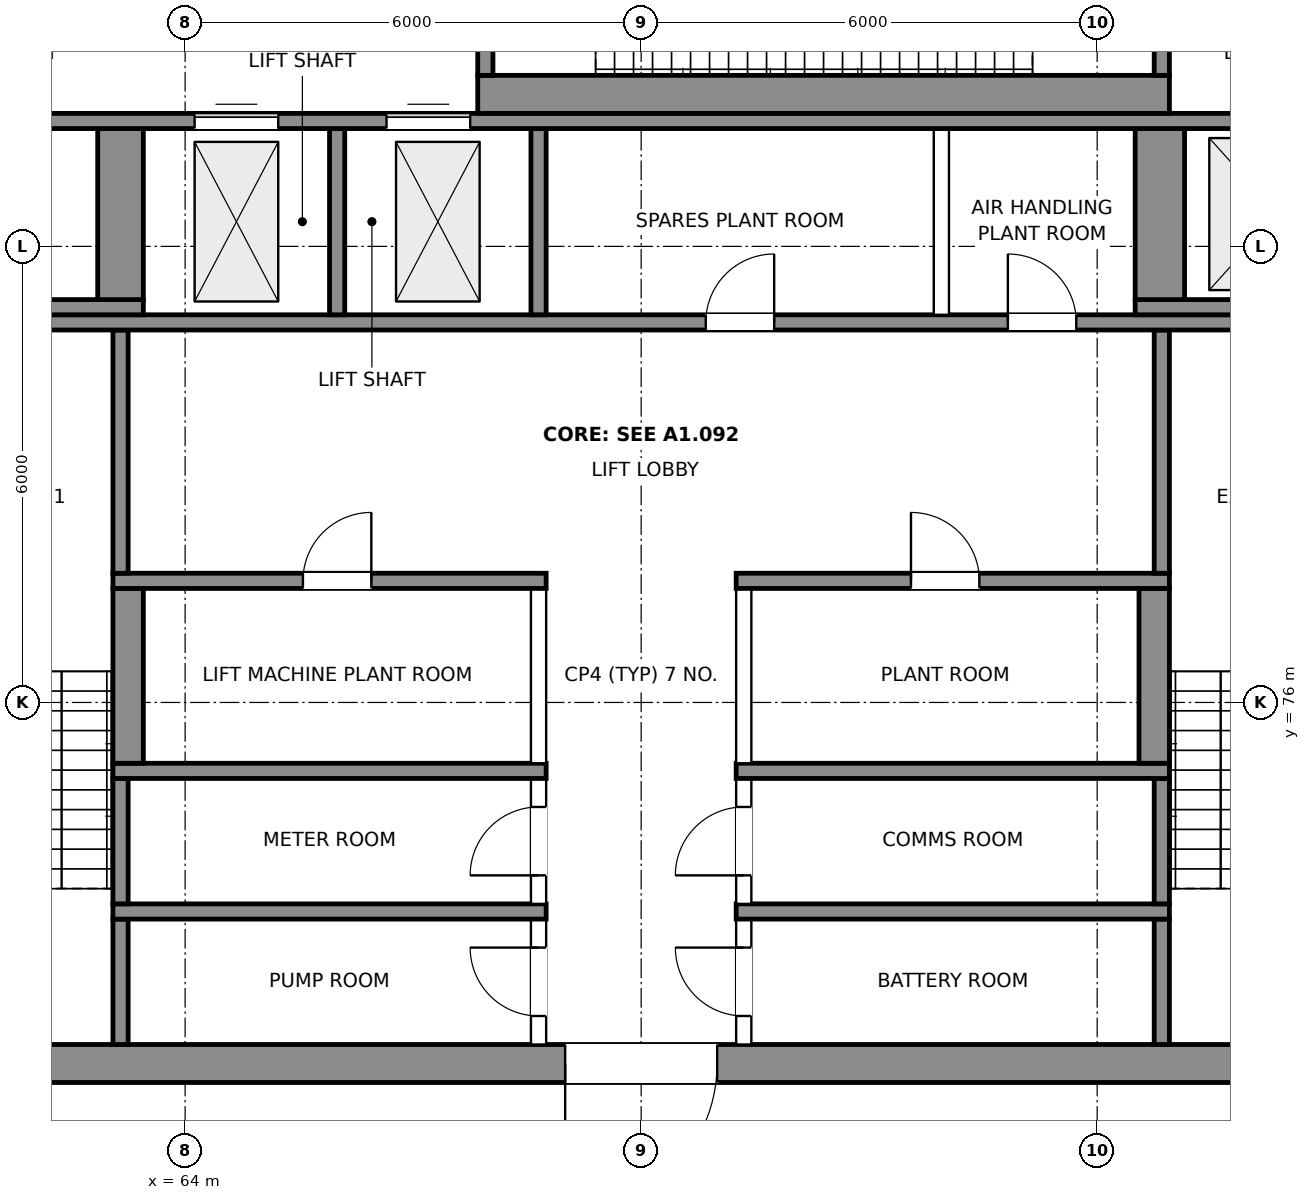
"""IFC4 building model, lengths in metres.
Left out: names, types, materials, properties, quantities, classifications, styles, units other than length and angle.
Written with IfcOpenShell. Run it as: python <this file> out.ifc"""

import sys

from ifc_helpers import new_model, si_unit, direction, frame, frame_2d, origin, place, context, subcontext, project, spatial, rectangle, extrude, element, fill, save


model = new_model("IFC4")
c1 = context("Model", 3, precision=1e-05, world=origin(), true_north=direction((0.0, 1.0)))
c2 = subcontext(c1, "Body", "Model", "MODEL_VIEW")
j1 = project(units=[si_unit("LENGTHUNIT", "METRE"), si_unit("PLANEANGLEUNIT", "RADIAN")], contexts=[c1])
p1 = place(None, origin())
s1 = spatial("IfcSite", under=j1, at=p1, CompositionType="ELEMENT")
p2 = place(p1, origin())
s2 = spatial("IfcBuilding", under=s1, at=p2, CompositionType="ELEMENT")
p3 = place(p2, frame((0.0, 0.0, 333.2)))
s3 = spatial("IfcBuildingStorey", under=s2, at=p3, CompositionType="ELEMENT", Elevation=333.2)
p4 = place(p3, frame((59.0, 71.25, 0.0), z_axis=(0.0, 0.0, 1.0), x_axis=(1.0, 0.0, 0.0)))
e1 = element("IfcWall", 1, at=p4, inside=s3, PredefinedType="SHEAR", context=c2, shape_type="SweptSolid", body=[
    extrude(rectangle(XDim=22.0, YDim=0.5, at=frame_2d((11.0, 0.0))), origin(), (0.0, 0.0, 1.0), 4.5),
])
p5 = place(p4, frame((2.025, 0.0, 0.0)))
e2 = element("IfcOpeningElement", 2, at=p5, cuts=e1, PredefinedType="OPENING", context=c2, shape_type="SweptSolid", body=[
    extrude(rectangle(XDim=1.2, YDim=2.1, at=frame_2d((0.6, 1.05))), frame((0.0, 0.26, 0.0), z_axis=(0.0, -1.0, 0.0), x_axis=(1.0, 0.0, 0.0)), (0.0, 0.0, 1.0), 0.52),
])
p6 = place(p4, frame((18.775, 0.0, 0.0)))
e3 = element("IfcOpeningElement", 3, at=p6, cuts=e1, PredefinedType="OPENING", context=c2, shape_type="SweptSolid", body=[
    extrude(rectangle(XDim=1.2, YDim=2.1, at=frame_2d((0.6, 1.05))), frame((0.0, 0.26, 0.0), z_axis=(0.0, -1.0, 0.0), x_axis=(1.0, 0.0, 0.0)), (0.0, 0.0, 1.0), 0.52),
])
p7 = place(p4, frame((10.0, 0.0, 0.0)))
e4 = element("IfcOpeningElement", 4, at=p7, cuts=e1, PredefinedType="OPENING", context=c2, shape_type="SweptSolid", body=[
    extrude(rectangle(XDim=2.0, YDim=2.1, at=frame_2d((1.0, 1.05))), frame((0.0, 0.26, 0.0), z_axis=(0.0, -1.0, 0.0), x_axis=(1.0, 0.0, 0.0)), (0.0, 0.0, 1.0), 0.52),
])
p8 = place(p3, frame((63.15, 71.5, 0.0), z_axis=(0.0, 0.0, 1.0), x_axis=(0.0, 1.0, 0.0)))
e5 = element("IfcWall", 5, at=p8, inside=s3, PredefinedType="SHEAR", context=c2, shape_type="SweptSolid", body=[
    extrude(rectangle(XDim=1.65, YDim=0.2, at=frame_2d((0.825, 0.0))), origin(), (0.0, 0.0, 1.0), 4.5),
])
p9 = place(p3, frame((68.65, 71.5, 0.0), z_axis=(0.0, 0.0, 1.0), x_axis=(0.0, 1.0, 0.0)))
e6 = element("IfcWall", 6, at=p9, inside=s3, PredefinedType="PARTITIONING", context=c2, shape_type="SweptSolid", body=[
    extrude(rectangle(XDim=1.65, YDim=0.2, at=frame_2d((0.825, 0.0))), origin(), (0.0, 0.0, 1.0), 4.2),
])
p10 = place(p9, frame((0.375, 0.0, 0.0)))
e7 = element("IfcOpeningElement", 7, at=p10, cuts=e6, PredefinedType="OPENING", context=c2, shape_type="SweptSolid", body=[
    extrude(rectangle(XDim=0.9, YDim=2.1, at=frame_2d((0.45, 1.05))), frame((0.0, 0.11, 0.0), z_axis=(0.0, -1.0, 0.0), x_axis=(1.0, 0.0, 0.0)), (0.0, 0.0, 1.0), 0.22),
])
p11 = place(p3, frame((71.35, 71.5, 0.0), z_axis=(0.0, 0.0, 1.0), x_axis=(0.0, 1.0, 0.0)))
e8 = element("IfcWall", 8, at=p11, inside=s3, PredefinedType="PARTITIONING", context=c2, shape_type="SweptSolid", body=[
    extrude(rectangle(XDim=1.65, YDim=0.2, at=frame_2d((0.825, 0.0))), origin(), (0.0, 0.0, 1.0), 4.2),
])
p12 = place(p11, frame((0.375, 0.0, 0.0)))
e9 = element("IfcOpeningElement", 9, at=p12, cuts=e8, PredefinedType="OPENING", context=c2, shape_type="SweptSolid", body=[
    extrude(rectangle(XDim=0.9, YDim=2.1, at=frame_2d((0.45, 1.05))), frame((0.0, 0.11, 0.0), z_axis=(0.0, -1.0, 0.0), x_axis=(1.0, 0.0, 0.0)), (0.0, 0.0, 1.0), 0.22),
])
p13 = place(p3, frame((76.85, 71.5, 0.0), z_axis=(0.0, 0.0, 1.0), x_axis=(0.0, 1.0, 0.0)))
e10 = element("IfcWall", 10, at=p13, inside=s3, PredefinedType="SHEAR", context=c2, shape_type="SweptSolid", body=[
    extrude(rectangle(XDim=1.65, YDim=0.2, at=frame_2d((0.825, 0.0))), origin(), (0.0, 0.0, 1.0), 4.5),
])
for number, where, z_axis, x_axis in (
    (11, (63.05, 73.25, 0.0), (0.0, 0.0, 1.0), (1.0, 0.0, 0.0)),
    (12, (71.25, 73.25, 0.0), (0.0, 0.0, 1.0), (1.0, 0.0, 0.0)),
):
    element("IfcWall", number, at=place(p3, frame(where, z_axis=z_axis, x_axis=x_axis)), inside=s3, PredefinedType="SHEAR", context=c2, shape_type="SweptSolid", body=[
        extrude(rectangle(XDim=5.7, YDim=0.2, at=frame_2d((2.85, 0.0))), origin(), (0.0, 0.0, 1.0), 4.5),
    ])
p14 = place(p3, frame((63.15, 73.35, 0.0), z_axis=(0.0, 0.0, 1.0), x_axis=(0.0, 1.0, 0.0)))
e13 = element("IfcWall", 13, at=p14, inside=s3, PredefinedType="SHEAR", context=c2, shape_type="SweptSolid", body=[
    extrude(rectangle(XDim=1.65, YDim=0.2, at=frame_2d((0.825, 0.0))), origin(), (0.0, 0.0, 1.0), 4.5),
])
p15 = place(p3, frame((68.65, 73.35, 0.0), z_axis=(0.0, 0.0, 1.0), x_axis=(0.0, 1.0, 0.0)))
e14 = element("IfcWall", 14, at=p15, inside=s3, PredefinedType="PARTITIONING", context=c2, shape_type="SweptSolid", body=[
    extrude(rectangle(XDim=1.65, YDim=0.2, at=frame_2d((0.825, 0.0))), origin(), (0.0, 0.0, 1.0), 4.2),
])
p16 = place(p15, frame((0.375, 0.0, 0.0)))
e15 = element("IfcOpeningElement", 15, at=p16, cuts=e14, PredefinedType="OPENING", context=c2, shape_type="SweptSolid", body=[
    extrude(rectangle(XDim=0.9, YDim=2.1, at=frame_2d((0.45, 1.05))), frame((0.0, 0.11, 0.0), z_axis=(0.0, -1.0, 0.0), x_axis=(1.0, 0.0, 0.0)), (0.0, 0.0, 1.0), 0.22),
])
p17 = place(p3, frame((71.35, 73.35, 0.0), z_axis=(0.0, 0.0, 1.0), x_axis=(0.0, 1.0, 0.0)))
e16 = element("IfcWall", 16, at=p17, inside=s3, PredefinedType="PARTITIONING", context=c2, shape_type="SweptSolid", body=[
    extrude(rectangle(XDim=1.65, YDim=0.2, at=frame_2d((0.825, 0.0))), origin(), (0.0, 0.0, 1.0), 4.2),
])
p18 = place(p17, frame((0.375, 0.0, 0.0)))
e17 = element("IfcOpeningElement", 17, at=p18, cuts=e16, PredefinedType="OPENING", context=c2, shape_type="SweptSolid", body=[
    extrude(rectangle(XDim=0.9, YDim=2.1, at=frame_2d((0.45, 1.05))), frame((0.0, 0.11, 0.0), z_axis=(0.0, -1.0, 0.0), x_axis=(1.0, 0.0, 0.0)), (0.0, 0.0, 1.0), 0.22),
])
p19 = place(p3, frame((76.85, 73.35, 0.0), z_axis=(0.0, 0.0, 1.0), x_axis=(0.0, 1.0, 0.0)))
e18 = element("IfcWall", 18, at=p19, inside=s3, PredefinedType="SHEAR", context=c2, shape_type="SweptSolid", body=[
    extrude(rectangle(XDim=1.65, YDim=0.2, at=frame_2d((0.825, 0.0))), origin(), (0.0, 0.0, 1.0), 4.5),
])
for number, where, z_axis, x_axis in (
    (19, (63.05, 75.1, 0.0), (0.0, 0.0, 1.0), (1.0, 0.0, 0.0)),
    (20, (71.25, 75.1, 0.0), (0.0, 0.0, 1.0), (1.0, 0.0, 0.0)),
):
    element("IfcWall", number, at=place(p3, frame(where, z_axis=z_axis, x_axis=x_axis)), inside=s3, PredefinedType="SHEAR", context=c2, shape_type="SweptSolid", body=[
        extrude(rectangle(XDim=5.7, YDim=0.2, at=frame_2d((2.85, 0.0))), origin(), (0.0, 0.0, 1.0), 4.5),
    ])
p20 = place(p3, frame((63.25, 75.2, 0.0), z_axis=(0.0, 0.0, 1.0), x_axis=(0.0, 1.0, 0.0)))
e21 = element("IfcWall", 21, at=p20, inside=s3, PredefinedType="SHEAR", context=c2, shape_type="SweptSolid", body=[
    extrude(rectangle(XDim=2.3, YDim=0.4, at=frame_2d((1.15, 0.0))), origin(), (0.0, 0.0, 1.0), 4.5),
])
for number, where, z_axis, x_axis in (
    (22, (68.65, 75.2, 0.0), (0.0, 0.0, 1.0), (0.0, 1.0, 0.0)),
    (23, (71.35, 75.2, 0.0), (0.0, 0.0, 1.0), (0.0, 1.0, 0.0)),
):
    element("IfcWall", number, at=place(p3, frame(where, z_axis=z_axis, x_axis=x_axis)), inside=s3, PredefinedType="PARTITIONING", context=c2, shape_type="SweptSolid", body=[
        extrude(rectangle(XDim=2.3, YDim=0.2, at=frame_2d((1.15, 0.0))), origin(), (0.0, 0.0, 1.0), 4.2),
    ])
p21 = place(p3, frame((76.75, 75.2, 0.0), z_axis=(0.0, 0.0, 1.0), x_axis=(0.0, 1.0, 0.0)))
e24 = element("IfcWall", 24, at=p21, inside=s3, PredefinedType="SHEAR", context=c2, shape_type="SweptSolid", body=[
    extrude(rectangle(XDim=2.3, YDim=0.4, at=frame_2d((1.15, 0.0))), origin(), (0.0, 0.0, 1.0), 4.5),
])
p22 = place(p3, frame((63.05, 77.6, 0.0), z_axis=(0.0, 0.0, 1.0), x_axis=(1.0, 0.0, 0.0)))
e25 = element("IfcWall", 25, at=p22, inside=s3, PredefinedType="SHEAR", context=c2, shape_type="SweptSolid", body=[
    extrude(rectangle(XDim=5.7, YDim=0.2, at=frame_2d((2.85, 0.0))), origin(), (0.0, 0.0, 1.0), 4.5),
])
p23 = place(p22, frame((2.5, 0.0, 0.0)))
e26 = element("IfcOpeningElement", 26, at=p23, cuts=e25, PredefinedType="OPENING", context=c2, shape_type="SweptSolid", body=[
    extrude(rectangle(XDim=0.9, YDim=2.1, at=frame_2d((0.45, 1.05))), frame((0.0, 0.11, 0.0), z_axis=(0.0, -1.0, 0.0), x_axis=(1.0, 0.0, 0.0)), (0.0, 0.0, 1.0), 0.22),
])
p24 = place(p3, frame((71.25, 77.6, 0.0), z_axis=(0.0, 0.0, 1.0), x_axis=(1.0, 0.0, 0.0)))
e27 = element("IfcWall", 27, at=p24, inside=s3, PredefinedType="SHEAR", context=c2, shape_type="SweptSolid", body=[
    extrude(rectangle(XDim=5.7, YDim=0.2, at=frame_2d((2.85, 0.0))), origin(), (0.0, 0.0, 1.0), 4.5),
])
p25 = place(p24, frame((2.3, 0.0, 0.0)))
e28 = element("IfcOpeningElement", 28, at=p25, cuts=e27, PredefinedType="OPENING", context=c2, shape_type="SweptSolid", body=[
    extrude(rectangle(XDim=0.9, YDim=2.1, at=frame_2d((0.45, 1.05))), frame((0.0, 0.11, 0.0), z_axis=(0.0, -1.0, 0.0), x_axis=(1.0, 0.0, 0.0)), (0.0, 0.0, 1.0), 0.22),
])
for number, where, z_axis, x_axis in (
    (29, (63.15, 77.7, 0.0), (0.0, 0.0, 1.0), (0.0, 1.0, 0.0)),
    (30, (76.85, 77.7, 0.0), (0.0, 0.0, 1.0), (0.0, 1.0, 0.0)),
):
    element("IfcWall", number, at=place(p3, frame(where, z_axis=z_axis, x_axis=x_axis)), inside=s3, PredefinedType="SHEAR", context=c2, shape_type="SweptSolid", body=[
        extrude(rectangle(XDim=3.2, YDim=0.2, at=frame_2d((1.6, 0.0))), origin(), (0.0, 0.0, 1.0), 4.5),
    ])
p26 = place(p3, frame((59.0, 81.0, 0.0), z_axis=(0.0, 0.0, 1.0), x_axis=(1.0, 0.0, 0.0)))
e31 = element("IfcWall", 31, at=p26, inside=s3, PredefinedType="SHEAR", context=c2, shape_type="SweptSolid", body=[
    extrude(rectangle(XDim=22.0, YDim=0.2, at=frame_2d((11.0, 0.0))), origin(), (0.0, 0.0, 1.0), 4.5),
])
p27 = place(p26, frame((11.85, 0.0, 0.0)))
e32 = element("IfcOpeningElement", 32, at=p27, cuts=e31, PredefinedType="OPENING", context=c2, shape_type="SweptSolid", body=[
    extrude(rectangle(XDim=0.9, YDim=2.1, at=frame_2d((0.45, 1.05))), frame((0.0, 0.11, 0.0), z_axis=(0.0, -1.0, 0.0), x_axis=(1.0, 0.0, 0.0)), (0.0, 0.0, 1.0), 0.22),
])
p28 = place(p26, frame((15.825, 0.0, 0.0)))
e33 = element("IfcOpeningElement", 33, at=p28, cuts=e31, PredefinedType="OPENING", context=c2, shape_type="SweptSolid", body=[
    extrude(rectangle(XDim=0.9, YDim=2.1, at=frame_2d((0.45, 1.05))), frame((0.0, 0.11, 0.0), z_axis=(0.0, -1.0, 0.0), x_axis=(1.0, 0.0, 0.0)), (0.0, 0.0, 1.0), 0.22),
])
p29 = place(p3, frame((59.0, 81.2, 0.0), z_axis=(0.0, 0.0, 1.0), x_axis=(1.0, 0.0, 0.0)))
e34 = element("IfcWall", 34, at=p29, inside=s3, PredefinedType="SHEAR", context=c2, shape_type="SweptSolid", body=[
    extrude(rectangle(XDim=4.45, YDim=0.2, at=frame_2d((2.225, 0.0))), origin(), (0.0, 0.0, 1.0), 4.5),
])
for number, where, z_axis, x_axis in (
    (35, (66.0, 81.1, 0.0), (0.0, 0.0, 1.0), (0.0, 1.0, 0.0)),
    (36, (68.65, 81.1, 0.0), (0.0, 0.0, 1.0), (0.0, 1.0, 0.0)),
):
    element("IfcWall", number, at=place(p3, frame(where, z_axis=z_axis, x_axis=x_axis)), inside=s3, PredefinedType="SHEAR", context=c2, shape_type="SweptSolid", body=[
        extrude(rectangle(XDim=2.45, YDim=0.2, at=frame_2d((1.225, 0.0))), origin(), (0.0, 0.0, 1.0), 4.5),
    ])
p30 = place(p3, frame((73.95, 81.1, 0.0), z_axis=(0.0, 0.0, 1.0), x_axis=(0.0, 1.0, 0.0)))
e37 = element("IfcWall", 37, at=p30, inside=s3, PredefinedType="PARTITIONING", context=c2, shape_type="SweptSolid", body=[
    extrude(rectangle(XDim=2.45, YDim=0.2, at=frame_2d((1.225, 0.0))), origin(), (0.0, 0.0, 1.0), 4.2),
])
p31 = place(p3, frame((76.5, 81.2, 0.0), z_axis=(0.0, 0.0, 1.0), x_axis=(1.0, 0.0, 0.0)))
e38 = element("IfcWall", 38, at=p31, inside=s3, PredefinedType="SHEAR", context=c2, shape_type="SweptSolid", body=[
    extrude(rectangle(XDim=4.5, YDim=0.2, at=frame_2d((2.25, 0.0))), origin(), (0.0, 0.0, 1.0), 4.5),
])
p32 = place(p3, frame((63.15, 81.3, 0.0), z_axis=(0.0, 0.0, 1.0), x_axis=(0.0, 1.0, 0.0)))
e39 = element("IfcWall", 39, at=p32, inside=s3, PredefinedType="SHEAR", context=c2, shape_type="SweptSolid", body=[
    extrude(rectangle(XDim=2.25, YDim=0.6, at=frame_2d((1.125, 0.0))), origin(), (0.0, 0.0, 1.0), 4.5),
])
p33 = place(p3, frame((76.825, 81.3, 0.0), z_axis=(0.0, 0.0, 1.0), x_axis=(0.0, 1.0, 0.0)))
e40 = element("IfcWall", 40, at=p33, inside=s3, PredefinedType="SHEAR", context=c2, shape_type="SweptSolid", body=[
    extrude(rectangle(XDim=2.25, YDim=0.65, at=frame_2d((1.125, 0.0))), origin(), (0.0, 0.0, 1.0), 4.5),
])
p34 = place(p3, frame((59.0, 83.65, 0.0), z_axis=(0.0, 0.0, 1.0), x_axis=(1.0, 0.0, 0.0)))
e41 = element("IfcWall", 41, at=p34, inside=s3, PredefinedType="SHEAR", context=c2, shape_type="SweptSolid", body=[
    extrude(rectangle(XDim=22.0, YDim=0.2, at=frame_2d((11.0, 0.0))), origin(), (0.0, 0.0, 1.0), 4.5),
])
p35 = place(p34, frame((5.125, 0.0, 0.0)))
e42 = element("IfcOpeningElement", 42, at=p35, cuts=e41, PredefinedType="OPENING", context=c2, shape_type="SweptSolid", body=[
    extrude(rectangle(XDim=1.1, YDim=2.1, at=frame_2d((0.55, 1.05))), frame((0.0, 0.11, 0.0), z_axis=(0.0, -1.0, 0.0), x_axis=(1.0, 0.0, 0.0)), (0.0, 0.0, 1.0), 0.22),
])
p36 = place(p34, frame((7.65, 0.0, 0.0)))
e43 = element("IfcOpeningElement", 43, at=p36, cuts=e41, PredefinedType="OPENING", context=c2, shape_type="SweptSolid", body=[
    extrude(rectangle(XDim=1.1, YDim=2.1, at=frame_2d((0.55, 1.05))), frame((0.0, 0.11, 0.0), z_axis=(0.0, -1.0, 0.0), x_axis=(1.0, 0.0, 0.0)), (0.0, 0.0, 1.0), 0.22),
])
p37 = place(p34, frame((18.775, 0.0, 0.0)))
e44 = element("IfcOpeningElement", 44, at=p37, cuts=e41, PredefinedType="OPENING", context=c2, shape_type="SweptSolid", body=[
    extrude(rectangle(XDim=1.2, YDim=2.1, at=frame_2d((0.6, 1.05))), frame((0.0, 0.11, 0.0), z_axis=(0.0, -1.0, 0.0), x_axis=(1.0, 0.0, 0.0)), (0.0, 0.0, 1.0), 0.22),
])
p38 = place(p34, frame((2.075, 0.0, 0.0)))
e45 = element("IfcOpeningElement", 45, at=p38, cuts=e41, PredefinedType="OPENING", context=c2, shape_type="SweptSolid", body=[
    extrude(rectangle(XDim=1.1, YDim=2.1, at=frame_2d((0.55, 1.05))), frame((0.0, 0.11, 0.0), z_axis=(0.0, -1.0, 0.0), x_axis=(1.0, 0.0, 0.0)), (0.0, 0.0, 1.0), 0.22),
])
p39 = place(p3, frame((67.85, 84.0, 0.0), z_axis=(0.0, 0.0, 1.0), x_axis=(1.0, 0.0, 0.0)))
e46 = element("IfcWall", 46, at=p39, inside=s3, PredefinedType="SHEAR", context=c2, shape_type="SweptSolid", body=[
    extrude(rectangle(XDim=9.1, YDim=0.5, at=frame_2d((4.55, 0.0))), origin(), (0.0, 0.0, 1.0), 4.5),
])
p40 = place(p3, frame((67.95, 84.25, 0.0), z_axis=(0.0, 0.0, 1.0), x_axis=(0.0, 1.0, 0.0)))
e47 = element("IfcWall", 47, at=p40, inside=s3, PredefinedType="SHEAR", context=c2, shape_type="SweptSolid", body=[
    extrude(rectangle(XDim=2.85, YDim=0.2, at=frame_2d((1.425, 0.0))), origin(), (0.0, 0.0, 1.0), 4.5),
])
p41 = place(p40, frame((0.825, 0.0, 0.0)))
e48 = element("IfcOpeningElement", 48, at=p41, cuts=e47, PredefinedType="OPENING", context=c2, shape_type="SweptSolid", body=[
    extrude(rectangle(XDim=1.2, YDim=2.1, at=frame_2d((0.6, 1.05))), frame((0.0, 0.11, 0.0), z_axis=(0.0, -1.0, 0.0), x_axis=(1.0, 0.0, 0.0)), (0.0, 0.0, 1.0), 0.22),
])
p42 = place(p3, frame((76.85, 84.25, 0.0), z_axis=(0.0, 0.0, 1.0), x_axis=(0.0, 1.0, 0.0)))
e49 = element("IfcWall", 49, at=p42, inside=s3, PredefinedType="SHEAR", context=c2, shape_type="SweptSolid", body=[
    extrude(rectangle(XDim=2.85, YDim=0.2, at=frame_2d((1.425, 0.0))), origin(), (0.0, 0.0, 1.0), 4.5),
])
p43 = place(p42, frame((1.575, 0.0, 0.0)))
e50 = element("IfcOpeningElement", 50, at=p43, cuts=e49, PredefinedType="OPENING", context=c2, shape_type="SweptSolid", body=[
    extrude(rectangle(XDim=1.2, YDim=2.1, at=frame_2d((0.6, 1.05))), frame((0.0, 0.11, 0.0), z_axis=(0.0, -1.0, 0.0), x_axis=(1.0, 0.0, 0.0)), (0.0, 0.0, 1.0), 0.22),
])
p44 = place(p7, frame((2.0, 0.0, 0.0), z_axis=(0.0, 0.0, 1.0), x_axis=(-1.0, 0.0, 0.0)))
e51 = element("IfcDoor", 51, at=p44, inside=s3, OperationType="DOUBLE_DOOR_SINGLE_SWING", PredefinedType="DOOR", context=c2, shape_type="SweptSolid", body=[
    extrude(rectangle(XDim=2.0, YDim=2.1, at=frame_2d((1.0, 1.05))), frame((0.0, 0.025, 0.0), z_axis=(0.0, -1.0, 0.0), x_axis=(1.0, 0.0, 0.0)), (0.0, 0.0, 1.0), 0.05),
])
fill(e4, e51)
p45 = place(p10, origin())
e52 = element("IfcDoor", 52, at=p45, inside=s3, OperationType="SINGLE_SWING_RIGHT", PredefinedType="DOOR", context=c2, shape_type="SweptSolid", body=[
    extrude(rectangle(XDim=0.9, YDim=2.1, at=frame_2d((0.45, 1.05))), frame((0.0, 0.025, 0.0), z_axis=(0.0, -1.0, 0.0), x_axis=(1.0, 0.0, 0.0)), (0.0, 0.0, 1.0), 0.05),
])
fill(e7, e52)
p46 = place(p16, origin())
e53 = element("IfcDoor", 53, at=p46, inside=s3, OperationType="SINGLE_SWING_LEFT", PredefinedType="DOOR", context=c2, shape_type="SweptSolid", body=[
    extrude(rectangle(XDim=0.9, YDim=2.1, at=frame_2d((0.45, 1.05))), frame((0.0, 0.025, 0.0), z_axis=(0.0, -1.0, 0.0), x_axis=(1.0, 0.0, 0.0)), (0.0, 0.0, 1.0), 0.05),
])
fill(e15, e53)
p47 = place(p12, origin())
e54 = element("IfcDoor", 54, at=p47, inside=s3, OperationType="SINGLE_SWING_RIGHT", PredefinedType="DOOR", context=c2, shape_type="SweptSolid", body=[
    extrude(rectangle(XDim=0.9, YDim=2.1, at=frame_2d((0.45, 1.05))), frame((0.0, 0.025, 0.0), z_axis=(0.0, -1.0, 0.0), x_axis=(1.0, 0.0, 0.0)), (0.0, 0.0, 1.0), 0.05),
])
fill(e9, e54)
p48 = place(p18, origin())
e55 = element("IfcDoor", 55, at=p48, inside=s3, OperationType="SINGLE_SWING_LEFT", PredefinedType="DOOR", context=c2, shape_type="SweptSolid", body=[
    extrude(rectangle(XDim=0.9, YDim=2.1, at=frame_2d((0.45, 1.05))), frame((0.0, 0.025, 0.0), z_axis=(0.0, -1.0, 0.0), x_axis=(1.0, 0.0, 0.0)), (0.0, 0.0, 1.0), 0.05),
])
fill(e17, e55)
p49 = place(p35, origin())
e56 = element("IfcDoor", 56, at=p49, inside=s3, OperationType="DOUBLE_DOOR_SLIDING", PredefinedType="DOOR", context=c2, shape_type="SweptSolid", body=[
    extrude(rectangle(XDim=1.1, YDim=2.1, at=frame_2d((0.55, 1.05))), frame((0.0, 0.025, 0.0), z_axis=(0.0, -1.0, 0.0), x_axis=(1.0, 0.0, 0.0)), (0.0, 0.0, 1.0), 0.05),
])
fill(e42, e56)
p50 = place(p36, origin())
e57 = element("IfcDoor", 57, at=p50, inside=s3, OperationType="DOUBLE_DOOR_SLIDING", PredefinedType="DOOR", context=c2, shape_type="SweptSolid", body=[
    extrude(rectangle(XDim=1.1, YDim=2.1, at=frame_2d((0.55, 1.05))), frame((0.0, 0.025, 0.0), z_axis=(0.0, -1.0, 0.0), x_axis=(1.0, 0.0, 0.0)), (0.0, 0.0, 1.0), 0.05),
])
fill(e43, e57)
p51 = place(p23, origin())
e58 = element("IfcDoor", 58, at=p51, inside=s3, OperationType="SINGLE_SWING_RIGHT", PredefinedType="DOOR", context=c2, shape_type="SweptSolid", body=[
    extrude(rectangle(XDim=0.9, YDim=2.1, at=frame_2d((0.45, 1.05))), frame((0.0, 0.025, 0.0), z_axis=(0.0, -1.0, 0.0), x_axis=(1.0, 0.0, 0.0)), (0.0, 0.0, 1.0), 0.05),
])
fill(e26, e58)
p52 = place(p25, origin())
e59 = element("IfcDoor", 59, at=p52, inside=s3, OperationType="SINGLE_SWING_LEFT", PredefinedType="DOOR", context=c2, shape_type="SweptSolid", body=[
    extrude(rectangle(XDim=0.9, YDim=2.1, at=frame_2d((0.45, 1.05))), frame((0.0, 0.025, 0.0), z_axis=(0.0, -1.0, 0.0), x_axis=(1.0, 0.0, 0.0)), (0.0, 0.0, 1.0), 0.05),
])
fill(e28, e59)
p53 = place(p27, origin())
e60 = element("IfcDoor", 60, at=p53, inside=s3, OperationType="SINGLE_SWING_RIGHT", PredefinedType="DOOR", context=c2, shape_type="SweptSolid", body=[
    extrude(rectangle(XDim=0.9, YDim=2.1, at=frame_2d((0.45, 1.05))), frame((0.0, 0.025, 0.0), z_axis=(0.0, -1.0, 0.0), x_axis=(1.0, 0.0, 0.0)), (0.0, 0.0, 1.0), 0.05),
])
fill(e32, e60)
p54 = place(p28, origin())
e61 = element("IfcDoor", 61, at=p54, inside=s3, OperationType="SINGLE_SWING_LEFT", PredefinedType="DOOR", context=c2, shape_type="SweptSolid", body=[
    extrude(rectangle(XDim=0.9, YDim=2.1, at=frame_2d((0.45, 1.05))), frame((0.0, 0.025, 0.0), z_axis=(0.0, -1.0, 0.0), x_axis=(1.0, 0.0, 0.0)), (0.0, 0.0, 1.0), 0.05),
])
fill(e33, e61)
save(model, sys.argv[1])
